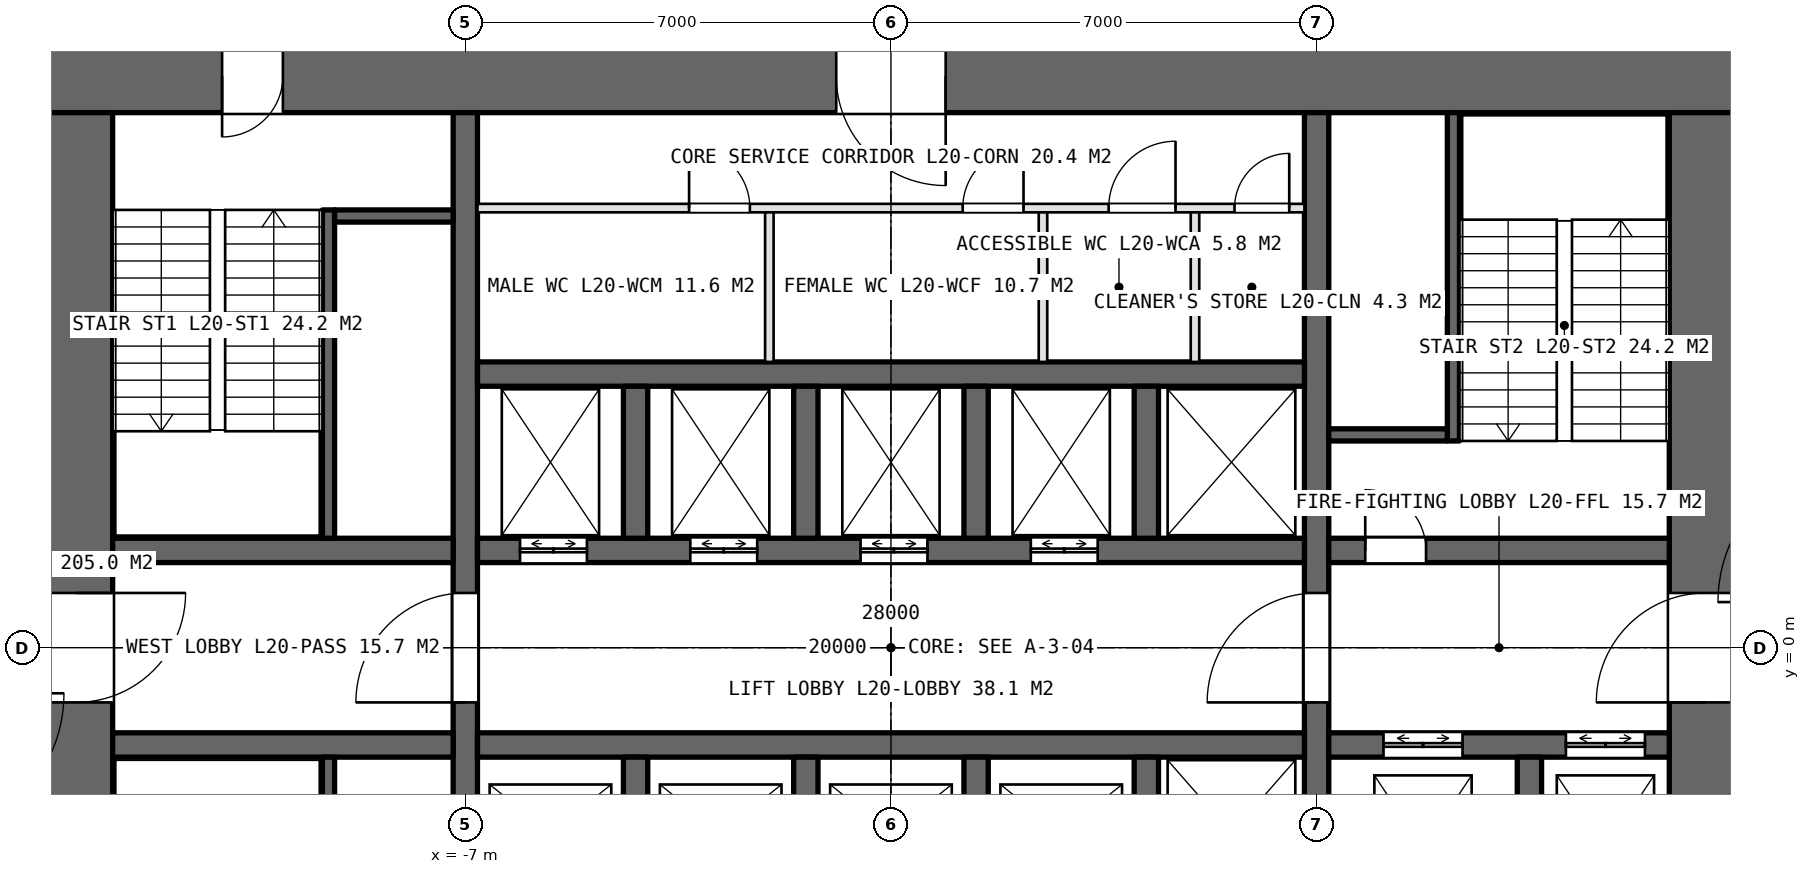
"""IFC4 building model, lengths in metres.
Left out: names, types, materials, properties, quantities, classifications, styles, units other than length and angle.
Written with IfcOpenShell. Run it as: python <this file> out.ifc"""

import sys

from ifc_helpers import new_model, si_unit, direction, frame, frame_2d, origin, place, context, subcontext, project, spatial, rectangle, extrude, element, fill, save


model = new_model("IFC4")
c1 = context("Model", 3, precision=1e-05, world=origin(), true_north=direction((0.0, 1.0)))
c2 = subcontext(c1, "Body", "Model", "MODEL_VIEW")
j1 = project(units=[si_unit("LENGTHUNIT", "METRE"), si_unit("PLANEANGLEUNIT", "RADIAN")], contexts=[c1])
p1 = place(None, origin())
s1 = spatial("IfcSite", under=j1, at=p1, CompositionType="ELEMENT")
p2 = place(p1, origin())
s2 = spatial("IfcBuilding", under=s1, at=p2, CompositionType="ELEMENT")
p3 = place(p2, frame((0.0, 0.0, 100.0)))
s3 = spatial("IfcBuildingStorey", under=s2, at=p3, CompositionType="ELEMENT", Elevation=100.0)
p4 = place(p3, frame((14.0, 9.4, 0.0), z_axis=(0.0, 0.0, 1.0), x_axis=(-1.0, 0.0, 0.0)))
e1 = element("IfcWall", 1, at=p4, inside=s3, PredefinedType="SHEAR", context=c2, shape_type="SweptSolid", body=[
    extrude(rectangle(XDim=28.0, YDim=1.2, at=frame_2d((14.0, 0.0))), origin(), (0.0, 0.0, 1.0), 5.0),
])
p5 = place(p4, frame((24.0, 0.0, 0.0)))
e2 = element("IfcOpeningElement", 2, at=p5, cuts=e1, PredefinedType="OPENING", context=c2, shape_type="SweptSolid", body=[
    extrude(rectangle(XDim=1.0, YDim=2.4, at=frame_2d((0.5, 1.2))), frame((0.0, 0.61, 0.0), z_axis=(0.0, -1.0, 0.0), x_axis=(1.0, 0.0, 0.0)), (0.0, 0.0, 1.0), 1.22),
])
p6 = place(p4, frame((13.1, 0.0, 0.0)))
e3 = element("IfcOpeningElement", 3, at=p6, cuts=e1, PredefinedType="OPENING", context=c2, shape_type="SweptSolid", body=[
    extrude(rectangle(XDim=1.8, YDim=2.4, at=frame_2d((0.9, 1.2))), frame((0.0, 0.61, 0.0), z_axis=(0.0, -1.0, 0.0), x_axis=(1.0, 0.0, 0.0)), (0.0, 0.0, 1.0), 1.22),
])
p7 = place(p3, frame((-13.4, 8.8, 0.0), z_axis=(0.0, 0.0, 1.0), x_axis=(0.0, -1.0, 0.0)))
e4 = element("IfcWall", 4, at=p7, inside=s3, PredefinedType="SHEAR", context=c2, shape_type="SweptSolid", body=[
    extrude(rectangle(XDim=17.6, YDim=1.2, at=frame_2d((8.8, 0.0))), origin(), (0.0, 0.0, 1.0), 5.0),
])
p8 = place(p7, frame((7.9, 0.0, 0.0)))
e5 = element("IfcOpeningElement", 5, at=p8, cuts=e4, PredefinedType="OPENING", context=c2, shape_type="SweptSolid", body=[
    extrude(rectangle(XDim=1.8, YDim=2.4, at=frame_2d((0.9, 1.2))), frame((0.0, 0.61, 0.0), z_axis=(0.0, -1.0, 0.0), x_axis=(1.0, 0.0, 0.0)), (0.0, 0.0, 1.0), 1.22),
])
p9 = place(p7, frame((16.5, 0.0, 0.0)))
e6 = element("IfcOpeningElement", 6, at=p9, cuts=e4, PredefinedType="OPENING", context=c2, shape_type="SweptSolid", body=[
    extrude(rectangle(XDim=1.0, YDim=2.4, at=frame_2d((0.5, 1.2))), frame((0.0, 0.61, 0.0), z_axis=(0.0, -1.0, 0.0), x_axis=(1.0, 0.0, 0.0)), (0.0, 0.0, 1.0), 1.22),
])
p10 = place(p3, frame((13.4, -8.8, 0.0), z_axis=(0.0, 0.0, 1.0), x_axis=(0.0, 1.0, 0.0)))
e7 = element("IfcWall", 7, at=p10, inside=s3, PredefinedType="SHEAR", context=c2, shape_type="SweptSolid", body=[
    extrude(rectangle(XDim=17.6, YDim=1.2, at=frame_2d((8.8, 0.0))), origin(), (0.0, 0.0, 1.0), 5.0),
])
p11 = place(p10, frame((7.9, 0.0, 0.0)))
e8 = element("IfcOpeningElement", 8, at=p11, cuts=e7, PredefinedType="OPENING", context=c2, shape_type="SweptSolid", body=[
    extrude(rectangle(XDim=1.8, YDim=2.4, at=frame_2d((0.9, 1.2))), frame((0.0, 0.61, 0.0), z_axis=(0.0, -1.0, 0.0), x_axis=(1.0, 0.0, 0.0)), (0.0, 0.0, 1.0), 1.22),
])
p12 = place(p3, frame((-7.0, -8.8, 0.0), z_axis=(0.0, 0.0, 1.0), x_axis=(0.0, 1.0, 0.0)))
e9 = element("IfcWall", 9, at=p12, inside=s3, PredefinedType="SHEAR", context=c2, shape_type="SweptSolid", body=[
    extrude(rectangle(XDim=17.6, YDim=0.4, at=frame_2d((8.8, 0.0))), origin(), (0.0, 0.0, 1.0), 5.0),
])
p13 = place(p12, frame((7.9, 0.0, 0.0)))
e10 = element("IfcOpeningElement", 10, at=p13, cuts=e9, PredefinedType="OPENING", context=c2, shape_type="SweptSolid", body=[
    extrude(rectangle(XDim=1.8, YDim=2.4, at=frame_2d((0.9, 1.2))), frame((0.0, 0.21, 0.0), z_axis=(0.0, -1.0, 0.0), x_axis=(1.0, 0.0, 0.0)), (0.0, 0.0, 1.0), 0.42),
])
p14 = place(p3, frame((7.0, -8.8, 0.0), z_axis=(0.0, 0.0, 1.0), x_axis=(0.0, 1.0, 0.0)))
e11 = element("IfcWall", 11, at=p14, inside=s3, PredefinedType="SHEAR", context=c2, shape_type="SweptSolid", body=[
    extrude(rectangle(XDim=17.6, YDim=0.4, at=frame_2d((8.8, 0.0))), origin(), (0.0, 0.0, 1.0), 5.0),
])
p15 = place(p14, frame((7.9, 0.0, 0.0)))
e12 = element("IfcOpeningElement", 12, at=p15, cuts=e11, PredefinedType="OPENING", context=c2, shape_type="SweptSolid", body=[
    extrude(rectangle(XDim=1.8, YDim=2.4, at=frame_2d((0.9, 1.2))), frame((0.0, 0.21, 0.0), z_axis=(0.0, -1.0, 0.0), x_axis=(1.0, 0.0, 0.0)), (0.0, 0.0, 1.0), 0.42),
])
p16 = place(p3, frame((-6.8, 1.6, 0.0), z_axis=(0.0, 0.0, 1.0), x_axis=(1.0, 0.0, 0.0)))
e13 = element("IfcWall", 13, at=p16, inside=s3, PredefinedType="SHEAR", context=c2, shape_type="SweptSolid", body=[
    extrude(rectangle(XDim=13.6, YDim=0.4, at=frame_2d((6.8, 0.0))), origin(), (0.0, 0.0, 1.0), 5.0),
])
p17 = place(p16, frame((0.7, 0.0, 0.0)))
e14 = element("IfcOpeningElement", 14, at=p17, cuts=e13, PredefinedType="OPENING", context=c2, shape_type="SweptSolid", body=[
    extrude(rectangle(XDim=1.1, YDim=2.4, at=frame_2d((0.55, 1.2))), frame((0.0, 0.21, 0.0), z_axis=(0.0, -1.0, 0.0), x_axis=(1.0, 0.0, 0.0)), (0.0, 0.0, 1.0), 0.42),
])
p18 = place(p16, frame((3.5, 0.0, 0.0)))
e15 = element("IfcOpeningElement", 15, at=p18, cuts=e13, PredefinedType="OPENING", context=c2, shape_type="SweptSolid", body=[
    extrude(rectangle(XDim=1.1, YDim=2.4, at=frame_2d((0.55, 1.2))), frame((0.0, 0.21, 0.0), z_axis=(0.0, -1.0, 0.0), x_axis=(1.0, 0.0, 0.0)), (0.0, 0.0, 1.0), 0.42),
])
p19 = place(p16, frame((6.3, 0.0, 0.0)))
e16 = element("IfcOpeningElement", 16, at=p19, cuts=e13, PredefinedType="OPENING", context=c2, shape_type="SweptSolid", body=[
    extrude(rectangle(XDim=1.1, YDim=2.4, at=frame_2d((0.55, 1.2))), frame((0.0, 0.21, 0.0), z_axis=(0.0, -1.0, 0.0), x_axis=(1.0, 0.0, 0.0)), (0.0, 0.0, 1.0), 0.42),
])
p20 = place(p16, frame((9.1, 0.0, 0.0)))
e17 = element("IfcOpeningElement", 17, at=p20, cuts=e13, PredefinedType="OPENING", context=c2, shape_type="SweptSolid", body=[
    extrude(rectangle(XDim=1.1, YDim=2.4, at=frame_2d((0.55, 1.2))), frame((0.0, 0.21, 0.0), z_axis=(0.0, -1.0, 0.0), x_axis=(1.0, 0.0, 0.0)), (0.0, 0.0, 1.0), 0.42),
])
for number, where, z_axis, x_axis in (
    (18, (-6.8, -1.6, 0.0), (0.0, 0.0, 1.0), (1.0, 0.0, 0.0)),
    (19, (-6.8, 4.5, 0.0), (0.0, 0.0, 1.0), (1.0, 0.0, 0.0)),
):
    element("IfcWall", number, at=place(p3, frame(where, z_axis=z_axis, x_axis=x_axis)), inside=s3, PredefinedType="SHEAR", context=c2, shape_type="SweptSolid", body=[
        extrude(rectangle(XDim=13.6, YDim=0.4, at=frame_2d((6.8, 0.0))), origin(), (0.0, 0.0, 1.0), 5.0),
    ])
for number, where, z_axis, x_axis in (
    (20, (-12.8, 1.6, 0.0), (0.0, 0.0, 1.0), (1.0, 0.0, 0.0)),
    (21, (-12.8, -1.6, 0.0), (0.0, 0.0, 1.0), (1.0, 0.0, 0.0)),
):
    element("IfcWall", number, at=place(p3, frame(where, z_axis=z_axis, x_axis=x_axis)), inside=s3, PredefinedType="SHEAR", context=c2, shape_type="SweptSolid", body=[
        extrude(rectangle(XDim=5.6, YDim=0.4, at=frame_2d((2.8, 0.0))), origin(), (0.0, 0.0, 1.0), 5.0),
    ])
p21 = place(p3, frame((7.2, 1.6, 0.0), z_axis=(0.0, 0.0, 1.0), x_axis=(1.0, 0.0, 0.0)))
e22 = element("IfcWall", 22, at=p21, inside=s3, PredefinedType="SHEAR", context=c2, shape_type="SweptSolid", body=[
    extrude(rectangle(XDim=5.6, YDim=0.4, at=frame_2d((2.8, 0.0))), origin(), (0.0, 0.0, 1.0), 5.0),
])
p22 = place(p21, frame((0.6, 0.0, 0.0)))
e23 = element("IfcOpeningElement", 23, at=p22, cuts=e22, PredefinedType="OPENING", context=c2, shape_type="SweptSolid", body=[
    extrude(rectangle(XDim=1.0, YDim=2.4, at=frame_2d((0.5, 1.2))), frame((0.0, 0.21, 0.0), z_axis=(0.0, -1.0, 0.0), x_axis=(1.0, 0.0, 0.0)), (0.0, 0.0, 1.0), 0.42),
])
p23 = place(p3, frame((7.2, -1.6, 0.0), z_axis=(0.0, 0.0, 1.0), x_axis=(1.0, 0.0, 0.0)))
e24 = element("IfcWall", 24, at=p23, inside=s3, PredefinedType="SHEAR", context=c2, shape_type="SweptSolid", body=[
    extrude(rectangle(XDim=5.6, YDim=0.4, at=frame_2d((2.8, 0.0))), origin(), (0.0, 0.0, 1.0), 5.0),
])
p24 = place(p23, frame((0.9, 0.0, 0.0)))
e25 = element("IfcOpeningElement", 25, at=p24, cuts=e24, PredefinedType="OPENING", context=c2, shape_type="SweptSolid", body=[
    extrude(rectangle(XDim=1.3, YDim=2.4, at=frame_2d((0.65, 1.2))), frame((0.0, 0.21, 0.0), z_axis=(0.0, -1.0, 0.0), x_axis=(1.0, 0.0, 0.0)), (0.0, 0.0, 1.0), 0.42),
])
p25 = place(p23, frame((3.9, 0.0, 0.0)))
e26 = element("IfcOpeningElement", 26, at=p25, cuts=e24, PredefinedType="OPENING", context=c2, shape_type="SweptSolid", body=[
    extrude(rectangle(XDim=1.3, YDim=2.4, at=frame_2d((0.65, 1.2))), frame((0.0, 0.21, 0.0), z_axis=(0.0, -1.0, 0.0), x_axis=(1.0, 0.0, 0.0)), (0.0, 0.0, 1.0), 0.42),
])
p26 = place(p3, frame((10.5, -4.8, 0.0), z_axis=(0.0, 0.0, 1.0), x_axis=(0.0, 1.0, 0.0)))
e27 = element("IfcWall", 27, at=p26, inside=s3, PredefinedType="SHEAR", context=c2, shape_type="SweptSolid", body=[
    extrude(rectangle(XDim=3.0, YDim=0.4, at=frame_2d((1.5, 0.0))), origin(), (0.0, 0.0, 1.0), 5.0),
])
for number, where, z_axis, x_axis in (
    (28, (-4.2, 1.8, 0.0), (0.0, 0.0, 1.0), (0.0, 1.0, 0.0)),
    (29, (-4.2, -4.3, 0.0), (0.0, 0.0, 1.0), (0.0, 1.0, 0.0)),
    (30, (-1.4, 1.8, 0.0), (0.0, 0.0, 1.0), (0.0, 1.0, 0.0)),
    (31, (-1.4, -4.3, 0.0), (0.0, 0.0, 1.0), (0.0, 1.0, 0.0)),
    (32, (1.4, 1.8, 0.0), (0.0, 0.0, 1.0), (0.0, 1.0, 0.0)),
    (33, (1.4, -4.3, 0.0), (0.0, 0.0, 1.0), (0.0, 1.0, 0.0)),
    (34, (4.2, 1.8, 0.0), (0.0, 0.0, 1.0), (0.0, 1.0, 0.0)),
    (35, (4.2, -4.3, 0.0), (0.0, 0.0, 1.0), (0.0, 1.0, 0.0)),
):
    element("IfcWall", number, at=place(p3, frame(where, z_axis=z_axis, x_axis=x_axis)), inside=s3, PredefinedType="SHEAR", context=c2, shape_type="SweptSolid", body=[
        extrude(rectangle(XDim=2.5, YDim=0.4, at=frame_2d((1.25, 0.0))), origin(), (0.0, 0.0, 1.0), 5.0),
    ])
p27 = place(p3, frame((-6.8, 7.23, 0.0), z_axis=(0.0, 0.0, 1.0), x_axis=(1.0, 0.0, 0.0)))
e36 = element("IfcWall", 36, at=p27, inside=s3, PredefinedType="PARTITIONING", context=c2, shape_type="SweptSolid", body=[
    extrude(rectangle(XDim=13.6, YDim=0.14, at=frame_2d((6.8, 0.0))), origin(), (0.0, 0.0, 1.0), 4.75),
])
p28 = place(p27, frame((3.48, 0.0, 0.0)))
e37 = element("IfcOpeningElement", 37, at=p28, cuts=e36, PredefinedType="OPENING", context=c2, shape_type="SweptSolid", body=[
    extrude(rectangle(XDim=1.0, YDim=2.4, at=frame_2d((0.5, 1.2))), frame((0.0, 0.08, 0.0), z_axis=(0.0, -1.0, 0.0), x_axis=(1.0, 0.0, 0.0)), (0.0, 0.0, 1.0), 0.16),
])
p29 = place(p27, frame((7.98, 0.0, 0.0)))
e38 = element("IfcOpeningElement", 38, at=p29, cuts=e36, PredefinedType="OPENING", context=c2, shape_type="SweptSolid", body=[
    extrude(rectangle(XDim=1.0, YDim=2.4, at=frame_2d((0.5, 1.2))), frame((0.0, 0.08, 0.0), z_axis=(0.0, -1.0, 0.0), x_axis=(1.0, 0.0, 0.0)), (0.0, 0.0, 1.0), 0.16),
])
p30 = place(p27, frame((10.38, 0.0, 0.0)))
e39 = element("IfcOpeningElement", 39, at=p30, cuts=e36, PredefinedType="OPENING", context=c2, shape_type="SweptSolid", body=[
    extrude(rectangle(XDim=1.1, YDim=2.4, at=frame_2d((0.55, 1.2))), frame((0.0, 0.08, 0.0), z_axis=(0.0, -1.0, 0.0), x_axis=(1.0, 0.0, 0.0)), (0.0, 0.0, 1.0), 0.16),
])
p31 = place(p27, frame((12.45, 0.0, 0.0)))
e40 = element("IfcOpeningElement", 40, at=p31, cuts=e36, PredefinedType="OPENING", context=c2, shape_type="SweptSolid", body=[
    extrude(rectangle(XDim=0.9, YDim=2.4, at=frame_2d((0.45, 1.2))), frame((0.0, 0.08, 0.0), z_axis=(0.0, -1.0, 0.0), x_axis=(1.0, 0.0, 0.0)), (0.0, 0.0, 1.0), 0.16),
])
for number, where, z_axis, x_axis in (
    (41, (-2.0, 4.7, 0.0), (0.0, 0.0, 1.0), (0.0, 1.0, 0.0)),
    (42, (2.5, 4.7, 0.0), (0.0, 0.0, 1.0), (0.0, 1.0, 0.0)),
    (43, (5.0, 4.7, 0.0), (0.0, 0.0, 1.0), (0.0, 1.0, 0.0)),
):
    element("IfcWall", number, at=place(p3, frame(where, z_axis=z_axis, x_axis=x_axis)), inside=s3, PredefinedType="PARTITIONING", context=c2, shape_type="SweptSolid", body=[
        extrude(rectangle(XDim=2.46, YDim=0.14, at=frame_2d((1.23, 0.0))), origin(), (0.0, 0.0, 1.0), 4.75),
    ])
p32 = place(p3, frame((-9.25, 7.2, 0.0), z_axis=(0.0, 0.0, 1.0), x_axis=(0.0, -1.0, 0.0)))
e44 = element("IfcWall", 44, at=p32, inside=s3, PredefinedType="SOLIDWALL", context=c2, shape_type="SweptSolid", body=[
    extrude(rectangle(XDim=5.4, YDim=0.2, at=frame_2d((2.7, 0.0))), origin(), (0.0, 0.0, 1.0), 5.0),
])
p33 = place(p3, frame((-9.15, 7.1, 0.0), z_axis=(0.0, 0.0, 1.0), x_axis=(1.0, 0.0, 0.0)))
e45 = element("IfcWall", 45, at=p33, inside=s3, PredefinedType="SOLIDWALL", context=c2, shape_type="SweptSolid", body=[
    extrude(rectangle(XDim=1.95, YDim=0.2, at=frame_2d((0.975, 0.0))), origin(), (0.0, 0.0, 1.0), 5.0),
])
p34 = place(p3, frame((-9.25, -7.2, 0.0), z_axis=(0.0, 0.0, 1.0), x_axis=(0.0, 1.0, 0.0)))
e46 = element("IfcWall", 46, at=p34, inside=s3, PredefinedType="SOLIDWALL", context=c2, shape_type="SweptSolid", body=[
    extrude(rectangle(XDim=5.4, YDim=0.2, at=frame_2d((2.7, 0.0))), origin(), (0.0, 0.0, 1.0), 5.0),
])
p35 = place(p3, frame((9.25, 3.4, 0.0), z_axis=(0.0, 0.0, 1.0), x_axis=(0.0, 1.0, 0.0)))
e47 = element("IfcWall", 47, at=p35, inside=s3, PredefinedType="SOLIDWALL", context=c2, shape_type="SweptSolid", body=[
    extrude(rectangle(XDim=5.4, YDim=0.2, at=frame_2d((2.7, 0.0))), origin(), (0.0, 0.0, 1.0), 5.0),
])
p36 = place(p3, frame((9.15, 3.5, 0.0), z_axis=(0.0, 0.0, 1.0), x_axis=(-1.0, 0.0, 0.0)))
e48 = element("IfcWall", 48, at=p36, inside=s3, PredefinedType="SOLIDWALL", context=c2, shape_type="SweptSolid", body=[
    extrude(rectangle(XDim=1.95, YDim=0.2, at=frame_2d((0.975, 0.0))), origin(), (0.0, 0.0, 1.0), 5.0),
])
p37 = place(p8, origin())
e49 = element("IfcDoor", 49, at=p37, inside=s3, OperationType="DOUBLE_DOOR_SINGLE_SWING", PredefinedType="DOOR", context=c2, shape_type="SweptSolid", body=[
    extrude(rectangle(XDim=1.8, YDim=2.4, at=frame_2d((0.9, 1.2))), frame((0.0, 0.025, 0.0), z_axis=(0.0, -1.0, 0.0), x_axis=(1.0, 0.0, 0.0)), (0.0, 0.0, 1.0), 0.05),
])
fill(e5, e49)
p38 = place(p11, origin())
e50 = element("IfcDoor", 50, at=p38, inside=s3, OperationType="DOUBLE_DOOR_SINGLE_SWING", PredefinedType="DOOR", context=c2, shape_type="SweptSolid", body=[
    extrude(rectangle(XDim=1.8, YDim=2.4, at=frame_2d((0.9, 1.2))), frame((0.0, 0.025, 0.0), z_axis=(0.0, -1.0, 0.0), x_axis=(1.0, 0.0, 0.0)), (0.0, 0.0, 1.0), 0.05),
])
fill(e8, e50)
p39 = place(p13, origin())
e51 = element("IfcDoor", 51, at=p39, inside=s3, OperationType="DOUBLE_DOOR_SINGLE_SWING", PredefinedType="DOOR", context=c2, shape_type="SweptSolid", body=[
    extrude(rectangle(XDim=1.8, YDim=2.4, at=frame_2d((0.9, 1.2))), frame((0.0, 0.025, 0.0), z_axis=(0.0, -1.0, 0.0), x_axis=(1.0, 0.0, 0.0)), (0.0, 0.0, 1.0), 0.05),
])
fill(e10, e51)
p40 = place(p15, origin())
e52 = element("IfcDoor", 52, at=p40, inside=s3, OperationType="DOUBLE_DOOR_SINGLE_SWING", PredefinedType="DOOR", context=c2, shape_type="SweptSolid", body=[
    extrude(rectangle(XDim=1.8, YDim=2.4, at=frame_2d((0.9, 1.2))), frame((0.0, 0.025, 0.0), z_axis=(0.0, -1.0, 0.0), x_axis=(1.0, 0.0, 0.0)), (0.0, 0.0, 1.0), 0.05),
])
fill(e12, e52)
p41 = place(p5, origin())
e53 = element("IfcDoor", 53, at=p41, inside=s3, OperationType="SINGLE_SWING_RIGHT", PredefinedType="DOOR", context=c2, shape_type="SweptSolid", body=[
    extrude(rectangle(XDim=1.0, YDim=2.4, at=frame_2d((0.5, 1.2))), frame((0.0, 0.025, 0.0), z_axis=(0.0, -1.0, 0.0), x_axis=(1.0, 0.0, 0.0)), (0.0, 0.0, 1.0), 0.05),
])
fill(e2, e53)
p42 = place(p22, origin())
e54 = element("IfcDoor", 54, at=p42, inside=s3, OperationType="SINGLE_SWING_LEFT", PredefinedType="DOOR", context=c2, shape_type="SweptSolid", body=[
    extrude(rectangle(XDim=1.0, YDim=2.4, at=frame_2d((0.5, 1.2))), frame((0.0, 0.025, 0.0), z_axis=(0.0, -1.0, 0.0), x_axis=(1.0, 0.0, 0.0)), (0.0, 0.0, 1.0), 0.05),
])
fill(e23, e54)
p43 = place(p28, origin())
e55 = element("IfcDoor", 55, at=p43, inside=s3, OperationType="SINGLE_SWING_LEFT", PredefinedType="DOOR", context=c2, shape_type="SweptSolid", body=[
    extrude(rectangle(XDim=1.0, YDim=2.4, at=frame_2d((0.5, 1.2))), frame((0.0, 0.025, 0.0), z_axis=(0.0, -1.0, 0.0), x_axis=(1.0, 0.0, 0.0)), (0.0, 0.0, 1.0), 0.05),
])
fill(e37, e55)
p44 = place(p29, origin())
e56 = element("IfcDoor", 56, at=p44, inside=s3, OperationType="SINGLE_SWING_RIGHT", PredefinedType="DOOR", context=c2, shape_type="SweptSolid", body=[
    extrude(rectangle(XDim=1.0, YDim=2.4, at=frame_2d((0.5, 1.2))), frame((0.0, 0.025, 0.0), z_axis=(0.0, -1.0, 0.0), x_axis=(1.0, 0.0, 0.0)), (0.0, 0.0, 1.0), 0.05),
])
fill(e38, e56)
p45 = place(p30, origin())
e57 = element("IfcDoor", 57, at=p45, inside=s3, OperationType="SINGLE_SWING_RIGHT", PredefinedType="DOOR", context=c2, shape_type="SweptSolid", body=[
    extrude(rectangle(XDim=1.1, YDim=2.4, at=frame_2d((0.55, 1.2))), frame((0.0, 0.025, 0.0), z_axis=(0.0, -1.0, 0.0), x_axis=(1.0, 0.0, 0.0)), (0.0, 0.0, 1.0), 0.05),
])
fill(e39, e57)
p46 = place(p31, origin())
e58 = element("IfcDoor", 58, at=p46, inside=s3, OperationType="SINGLE_SWING_RIGHT", PredefinedType="DOOR", context=c2, shape_type="SweptSolid", body=[
    extrude(rectangle(XDim=0.9, YDim=2.4, at=frame_2d((0.45, 1.2))), frame((0.0, 0.025, 0.0), z_axis=(0.0, -1.0, 0.0), x_axis=(1.0, 0.0, 0.0)), (0.0, 0.0, 1.0), 0.05),
])
fill(e40, e58)
p47 = place(p6, origin())
e59 = element("IfcDoor", 59, at=p47, inside=s3, OperationType="DOUBLE_DOOR_SINGLE_SWING", PredefinedType="DOOR", context=c2, shape_type="SweptSolid", body=[
    extrude(rectangle(XDim=1.8, YDim=2.4, at=frame_2d((0.9, 1.2))), frame((0.0, 0.025, 0.0), z_axis=(0.0, -1.0, 0.0), x_axis=(1.0, 0.0, 0.0)), (0.0, 0.0, 1.0), 0.05),
])
fill(e3, e59)
p48 = place(p17, origin())
e60 = element("IfcDoor", 60, at=p48, inside=s3, OperationType="DOUBLE_DOOR_SLIDING", PredefinedType="DOOR", context=c2, shape_type="SweptSolid", body=[
    extrude(rectangle(XDim=1.1, YDim=2.4, at=frame_2d((0.55, 1.2))), frame((0.0, 0.025, 0.0), z_axis=(0.0, -1.0, 0.0), x_axis=(1.0, 0.0, 0.0)), (0.0, 0.0, 1.0), 0.05),
])
fill(e14, e60)
p49 = place(p18, origin())
e61 = element("IfcDoor", 61, at=p49, inside=s3, OperationType="DOUBLE_DOOR_SLIDING", PredefinedType="DOOR", context=c2, shape_type="SweptSolid", body=[
    extrude(rectangle(XDim=1.1, YDim=2.4, at=frame_2d((0.55, 1.2))), frame((0.0, 0.025, 0.0), z_axis=(0.0, -1.0, 0.0), x_axis=(1.0, 0.0, 0.0)), (0.0, 0.0, 1.0), 0.05),
])
fill(e15, e61)
p50 = place(p19, origin())
e62 = element("IfcDoor", 62, at=p50, inside=s3, OperationType="DOUBLE_DOOR_SLIDING", PredefinedType="DOOR", context=c2, shape_type="SweptSolid", body=[
    extrude(rectangle(XDim=1.1, YDim=2.4, at=frame_2d((0.55, 1.2))), frame((0.0, 0.025, 0.0), z_axis=(0.0, -1.0, 0.0), x_axis=(1.0, 0.0, 0.0)), (0.0, 0.0, 1.0), 0.05),
])
fill(e16, e62)
p51 = place(p20, origin())
e63 = element("IfcDoor", 63, at=p51, inside=s3, OperationType="DOUBLE_DOOR_SLIDING", PredefinedType="DOOR", context=c2, shape_type="SweptSolid", body=[
    extrude(rectangle(XDim=1.1, YDim=2.4, at=frame_2d((0.55, 1.2))), frame((0.0, 0.025, 0.0), z_axis=(0.0, -1.0, 0.0), x_axis=(1.0, 0.0, 0.0)), (0.0, 0.0, 1.0), 0.05),
])
fill(e17, e63)
p52 = place(p24, origin())
e64 = element("IfcDoor", 64, at=p52, inside=s3, OperationType="DOUBLE_DOOR_SLIDING", PredefinedType="DOOR", context=c2, shape_type="SweptSolid", body=[
    extrude(rectangle(XDim=1.3, YDim=2.4, at=frame_2d((0.65, 1.2))), frame((0.0, 0.025, 0.0), z_axis=(0.0, -1.0, 0.0), x_axis=(1.0, 0.0, 0.0)), (0.0, 0.0, 1.0), 0.05),
])
fill(e25, e64)
p53 = place(p25, origin())
e65 = element("IfcDoor", 65, at=p53, inside=s3, OperationType="DOUBLE_DOOR_SLIDING", PredefinedType="DOOR", context=c2, shape_type="SweptSolid", body=[
    extrude(rectangle(XDim=1.3, YDim=2.4, at=frame_2d((0.65, 1.2))), frame((0.0, 0.025, 0.0), z_axis=(0.0, -1.0, 0.0), x_axis=(1.0, 0.0, 0.0)), (0.0, 0.0, 1.0), 0.05),
])
fill(e26, e65)
save(model, sys.argv[1])
